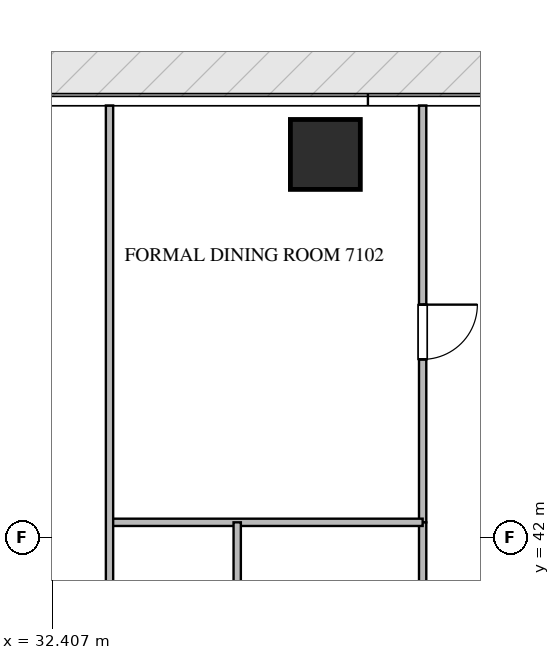
"""IFC4 building model, lengths in metres.
Left out: names, types, materials, properties, quantities, classifications, styles, units other than length and angle.
Written with IfcOpenShell. Run it as: python <this file> out.ifc"""

import sys

from ifc_helpers import new_model, si_unit, direction, frame, frame_2d, origin, origin_2d, place, context, subcontext, project, spatial, rectangle, extrude, source, transform, mapped, element, fill, save


model = new_model("IFC4")
c1 = context("Model", 3, precision=1e-05, world=origin(), true_north=direction((0.0, 1.0)))
c2 = subcontext(c1, "Body", "Model", "MODEL_VIEW")
j1 = project(units=[si_unit("LENGTHUNIT", "METRE"), si_unit("PLANEANGLEUNIT", "RADIAN")], contexts=[c1])
p1 = place(None, origin())
s1 = spatial("IfcSite", under=j1, at=p1, CompositionType="ELEMENT")
p2 = place(p1, origin())
s2 = spatial("IfcBuilding", under=s1, at=p2, CompositionType="ELEMENT")
p3 = place(p2, frame((0.0, 0.0, 283.6)))
s3 = spatial("IfcBuildingStorey", under=s2, at=p3, CompositionType="ELEMENT", Elevation=283.6)
m1 = source(origin(), c2, "Body", "SweptSolid", [
    extrude(rectangle(XDim=1.15, YDim=1.15, at=origin_2d()), origin(), (0.0, 0.0, 1.0), 3.67),
])
p4 = place(p3, frame((36.9, 48.3, -0.26), z_axis=(0.0, 0.0, 1.0), x_axis=(1.0, 0.0, 0.0)))
e1 = element("IfcColumn", 1, at=p4, inside=s3, PredefinedType="COLUMN", context=c2, shape_type="MappedRepresentation", body=[
    mapped(m1, transform((0.0, 0.0, 0.0), scale=1.0)),
])
p5 = place(p3, frame((38.5, 49.105, 0.0), z_axis=(0.0, 0.0, 1.0), x_axis=(0.0, -1.0, 0.0)))
e2 = element("IfcWall", 2, at=p5, inside=s3, PredefinedType="PARTITIONING", context=c2, shape_type="SweptSolid", body=[
    extrude(rectangle(XDim=6.855, YDim=0.12, at=frame_2d((3.427, 0.0))), origin(), (0.0, 0.0, 1.0), 3.41),
])
p6 = place(p5, frame((3.275, 0.0, 0.0)))
e3 = element("IfcOpeningElement", 3, at=p6, cuts=e2, PredefinedType="OPENING", context=c2, shape_type="SweptSolid", body=[
    extrude(rectangle(XDim=0.9, YDim=2.1, at=frame_2d((0.45, 1.05))), frame((0.0, 0.07, 0.0), z_axis=(0.0, -1.0, 0.0), x_axis=(1.0, 0.0, 0.0)), (0.0, 0.0, 1.0), 0.14),
])
p7 = place(p3, frame((38.5, 42.248, 0.0), z_axis=(0.0, 0.0, 1.0), x_axis=(0.0, -1.0, 0.0)))
e4 = element("IfcWall", 4, at=p7, inside=s3, PredefinedType="PARTITIONING", context=c2, shape_type="SweptSolid", body=[
    extrude(rectangle(XDim=6.496, YDim=0.12, at=frame_2d((3.248, 0.0))), origin(), (0.0, 0.0, 1.0), 3.41),
])
p8 = place(p3, frame((33.35, 42.25, 0.0), z_axis=(0.0, 0.0, 1.0), x_axis=(1.0, 0.0, 0.0)))
e5 = element("IfcWall", 5, at=p8, inside=s3, PredefinedType="PARTITIONING", context=c2, shape_type="SweptSolid", body=[
    extrude(rectangle(XDim=5.15, YDim=0.12, at=frame_2d((2.575, 0.0))), origin(), (0.0, 0.0, 1.0), 3.41),
])
p9 = place(p3, frame((33.35, 49.105, 0.0), z_axis=(0.0, 0.0, 1.0), x_axis=(0.0, -1.0, 0.0)))
e6 = element("IfcWall", 6, at=p9, inside=s3, PredefinedType="PARTITIONING", context=c2, shape_type="SweptSolid", body=[
    extrude(rectangle(XDim=13.355, YDim=0.12, at=frame_2d((6.677, 0.0))), origin(), (0.0, 0.0, 1.0), 3.41),
])
p10 = place(p3, frame((35.45, 42.25, 0.0), z_axis=(0.0, 0.0, 1.0), x_axis=(0.0, -1.0, 0.0)))
e7 = element("IfcWall", 7, at=p10, inside=s3, PredefinedType="PARTITIONING", context=c2, shape_type="SweptSolid", body=[
    extrude(rectangle(XDim=6.5, YDim=0.12, at=frame_2d((3.25, 0.0))), origin(), (0.0, 0.0, 1.0), 3.41),
])
m2 = source(origin(), c2, "Body", "SweptSolid", [
    extrude(rectangle(XDim=0.9, YDim=2.1, at=frame_2d((0.45, 1.05))), frame((0.0, 0.025, 0.0), z_axis=(0.0, -1.0, 0.0), x_axis=(1.0, 0.0, 0.0)), (0.0, 0.0, 1.0), 0.05),
])
p11 = place(p6, origin())
e8 = element("IfcDoor", 8, at=p11, inside=s3, OperationType="SINGLE_SWING_LEFT", PredefinedType="DOOR", context=c2, shape_type="MappedRepresentation", body=[
    mapped(m2, transform((0.0, 0.0, 0.0), scale=1.0)),
])
fill(e3, e8)
save(model, sys.argv[1])
